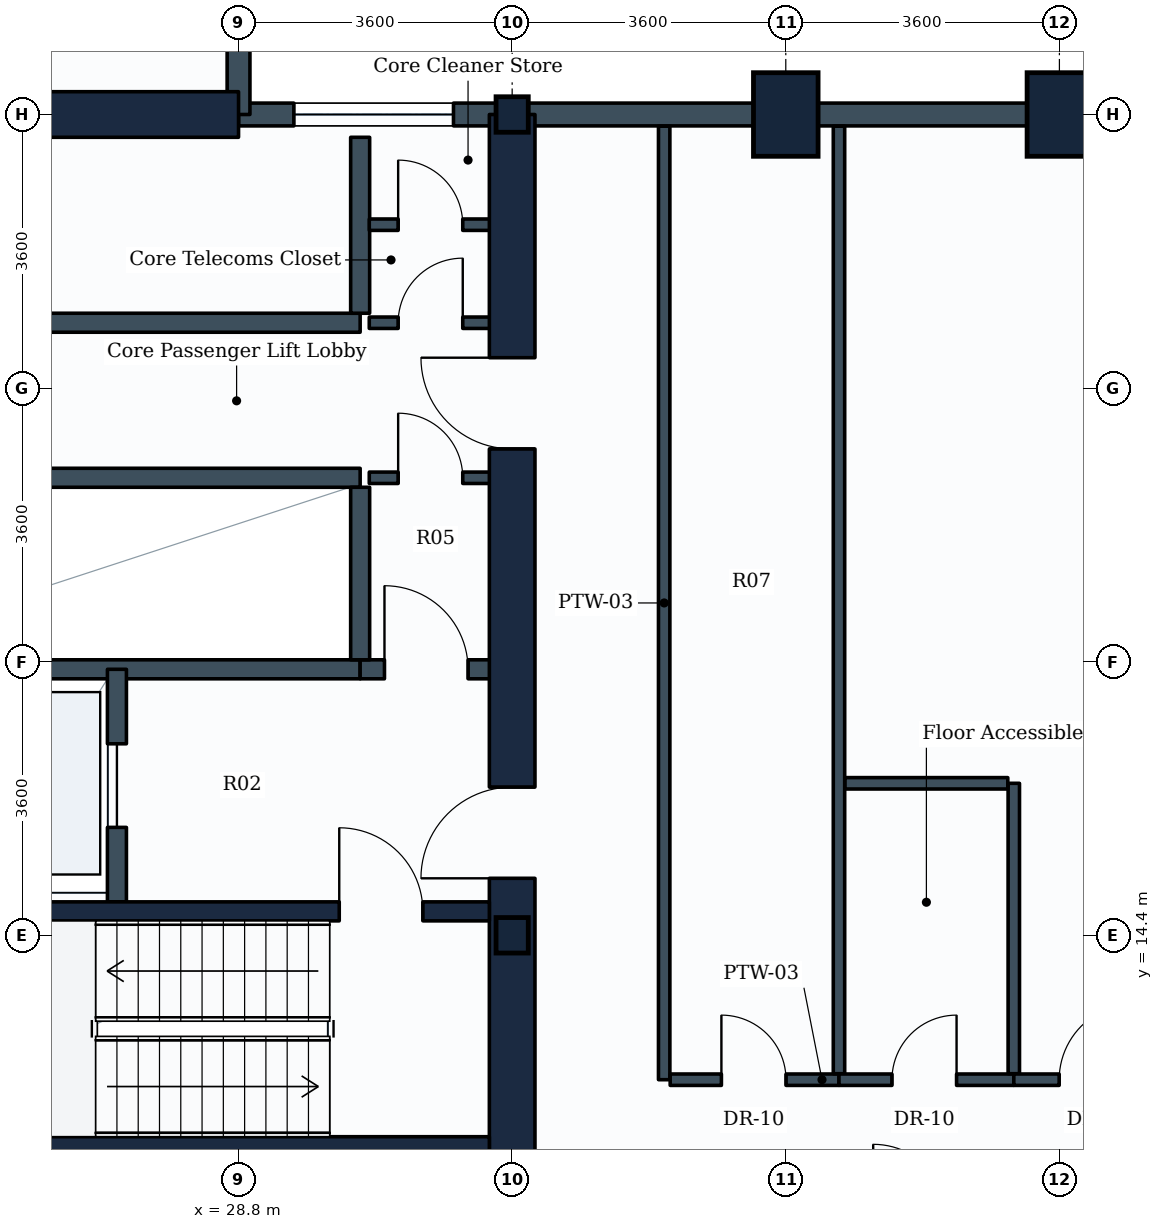
"""IFC4 building model, lengths in metres.
Left out: names, types, materials, properties, quantities, classifications, styles, units other than length and angle.
Written with IfcOpenShell. Run it as: python <this file> out.ifc"""

import sys

from ifc_helpers import new_model, si_unit, direction, frame, frame_2d, origin, origin_2d, place, context, subcontext, project, spatial, rectangle, i_section, extrude, element, fill, save


model = new_model("IFC4")
c1 = context("Model", 3, precision=1e-05, world=origin(), true_north=direction((0.0, 1.0)))
c2 = subcontext(c1, "Body", "Model", "MODEL_VIEW")
j1 = project(units=[si_unit("LENGTHUNIT", "METRE"), si_unit("PLANEANGLEUNIT", "RADIAN")], contexts=[c1])
p1 = place(None, origin())
s1 = spatial("IfcSite", under=j1, at=p1, CompositionType="ELEMENT")
p2 = place(p1, origin())
s2 = spatial("IfcBuilding", under=s1, at=p2, CompositionType="ELEMENT")
p3 = place(p2, frame((0.0, 0.0, 84.0)))
s3 = spatial("IfcBuildingStorey", under=s2, at=p3, CompositionType="ELEMENT", Elevation=84.0)
for number, where, z_axis, x_axis in (
    (1, (32.4, 14.4, 0.0), (0.0, 0.0, 1.0), (1.0, 0.0, 0.0)),
    (2, (32.4, 25.2, 0.0), (0.0, 0.0, 1.0), (1.0, 0.0, 0.0)),
):
    element("IfcColumn", number, at=place(p3, frame(where, z_axis=z_axis, x_axis=x_axis)), inside=s3, PredefinedType="COLUMN", context=c2, shape_type="SweptSolid", body=[
        extrude(i_section(OverallWidth=0.424, OverallDepth=0.467, WebThickness=0.033, FlangeThickness=0.053, FilletRadius=0.015, at=origin_2d()), origin(), (0.0, 0.0, 1.0), 3.9),
    ])
for number, where, z_axis, x_axis in (
    (3, (36.0, 25.2, 0.0), (0.0, 0.0, 1.0), (1.0, 0.0, 0.0)),
    (4, (39.6, 25.2, 0.0), (0.0, 0.0, 1.0), (1.0, 0.0, 0.0)),
):
    element("IfcColumn", number, at=place(p3, frame(where, z_axis=z_axis, x_axis=x_axis)), inside=s3, PredefinedType="COLUMN", context=c2, shape_type="SweptSolid", body=[
        extrude(rectangle(XDim=0.85, YDim=1.1, at=origin_2d()), origin(), (0.0, 0.0, 1.0), 3.9),
    ])
p4 = place(p3, frame((39.6, 25.2, 0.0), z_axis=(0.0, 0.0, 1.0), x_axis=(1.0, 0.0, 0.0)))
e5 = element("IfcWall", 5, at=p4, inside=s3, PredefinedType="STANDARD", context=c2, shape_type="SweptSolid", body=[
    extrude(rectangle(XDim=3.6, YDim=0.3, at=frame_2d((1.8, 0.0))), origin(), (0.0, 0.0, 1.0), 2.93),
])
for number, where, z_axis, x_axis in (
    (6, (36.0, 25.2, 0.0), (0.0, 0.0, 1.0), (1.0, 0.0, 0.0)),
    (7, (32.4, 25.2, 0.0), (0.0, 0.0, 1.0), (1.0, 0.0, 0.0)),
):
    element("IfcWall", number, at=place(p3, frame(where, z_axis=z_axis, x_axis=x_axis)), inside=s3, PredefinedType="STANDARD", context=c2, shape_type="SweptSolid", body=[
        extrude(rectangle(XDim=3.6, YDim=0.3, at=frame_2d((1.8, 0.0))), origin(), (0.0, 0.0, 1.0), 2.93),
    ])
p5 = place(p3, frame((28.8, 25.2, 0.0), z_axis=(0.0, 0.0, 1.0), x_axis=(1.0, 0.0, 0.0)))
e8 = element("IfcWall", 8, at=p5, inside=s3, PredefinedType="STANDARD", context=c2, shape_type="SweptSolid", body=[
    extrude(rectangle(XDim=3.6, YDim=0.3, at=frame_2d((1.8, 0.0))), origin(), (0.0, 0.0, 1.0), 3.635),
])
p6 = place(p5, frame((0.728, 0.0, 0.85)))
e9 = element("IfcOpeningElement", 9, at=p6, cuts=e8, PredefinedType="OPENING", context=c2, shape_type="SweptSolid", body=[
    extrude(rectangle(XDim=2.1, YDim=1.35, at=frame_2d((1.05, 0.675))), frame((0.0, 0.16, 0.0), z_axis=(0.0, -1.0, 0.0), x_axis=(1.0, 0.0, 0.0)), (0.0, 0.0, 1.0), 0.32),
])
p7 = place(p3, frame((28.8, 28.8, 0.0), z_axis=(0.0, 0.0, 1.0), x_axis=(0.0, -1.0, 0.0)))
e10 = element("IfcWall", 10, at=p7, inside=s3, PredefinedType="STANDARD", context=c2, shape_type="SweptSolid", body=[
    extrude(rectangle(XDim=3.6, YDim=0.3, at=frame_2d((1.8, 0.0))), origin(), (0.0, 0.0, 1.0), 3.19),
])
p8 = place(p3, frame((14.4, 25.2, 0.0), z_axis=(0.0, 0.0, 1.0), x_axis=(1.0, 0.0, 0.0)))
e11 = element("IfcWall", 11, at=p8, inside=s3, PredefinedType="SHEAR", context=c2, shape_type="SweptSolid", body=[
    extrude(rectangle(XDim=14.4, YDim=0.6, at=frame_2d((7.2, 0.0))), origin(), (0.0, 0.0, 1.0), 3.65),
])
p9 = place(p3, frame((32.4, 10.8, 0.0), z_axis=(0.0, 0.0, 1.0), x_axis=(0.0, 1.0, 0.0)))
e12 = element("IfcWall", 12, at=p9, inside=s3, PredefinedType="SHEAR", context=c2, shape_type="SweptSolid", body=[
    extrude(rectangle(XDim=14.4, YDim=0.6, at=frame_2d((7.2, 0.0))), origin(), (0.0, 0.0, 1.0), 3.65),
])
p10 = place(p9, frame((4.35, 0.0, 0.0)))
e13 = element("IfcOpeningElement", 13, at=p10, cuts=e12, PredefinedType="OPENING", context=c2, shape_type="SweptSolid", body=[
    extrude(rectangle(XDim=1.2, YDim=2.1, at=frame_2d((0.6, 1.05))), frame((0.0, 0.31, 0.0), z_axis=(0.0, -1.0, 0.0), x_axis=(1.0, 0.0, 0.0)), (0.0, 0.0, 1.0), 0.62),
])
p11 = place(p9, frame((10.0, 0.0, 0.0)))
e14 = element("IfcOpeningElement", 14, at=p11, cuts=e12, PredefinedType="OPENING", context=c2, shape_type="SweptSolid", body=[
    extrude(rectangle(XDim=1.2, YDim=2.1, at=frame_2d((0.6, 1.05))), frame((0.0, 0.31, 0.0), z_axis=(0.0, -1.0, 0.0), x_axis=(1.0, 0.0, 0.0)), (0.0, 0.0, 1.0), 0.62),
])
p12 = place(p3, frame((23.35, 11.625, 0.0), z_axis=(0.0, 0.0, 1.0), x_axis=(1.0, 0.0, 0.0)))
e15 = element("IfcWall", 15, at=p12, inside=s3, PredefinedType="SHEAR", context=c2, shape_type="SweptSolid", body=[
    extrude(rectangle(XDim=8.75, YDim=0.25, at=frame_2d((4.375, 0.0))), origin(), (0.0, 0.0, 1.0), 3.65),
])
p13 = place(p3, frame((23.35, 14.715, 0.0), z_axis=(0.0, 0.0, 1.0), x_axis=(1.0, 0.0, 0.0)))
e16 = element("IfcWall", 16, at=p13, inside=s3, PredefinedType="SHEAR", context=c2, shape_type="SweptSolid", body=[
    extrude(rectangle(XDim=8.75, YDim=0.25, at=frame_2d((4.375, 0.0))), origin(), (0.0, 0.0, 1.0), 3.65),
])
p14 = place(p13, frame((6.775, 0.0, 0.0)))
e17 = element("IfcOpeningElement", 17, at=p14, cuts=e16, PredefinedType="OPENING", context=c2, shape_type="SweptSolid", body=[
    extrude(rectangle(XDim=1.1, YDim=2.1, at=frame_2d((0.55, 1.05))), frame((0.0, 0.135, 0.0), z_axis=(0.0, -1.0, 0.0), x_axis=(1.0, 0.0, 0.0)), (0.0, 0.0, 1.0), 0.27),
])
p15 = place(p3, frame((21.88, 17.9, 0.0), z_axis=(0.0, 0.0, 1.0), x_axis=(1.0, 0.0, 0.0)))
e18 = element("IfcWall", 18, at=p15, inside=s3, PredefinedType="PARTITIONING", context=c2, shape_type="SweptSolid", body=[
    extrude(rectangle(XDim=8.52, YDim=0.25, at=frame_2d((4.26, 0.0))), origin(), (0.0, 0.0, 1.0), 3.635),
])
p16 = place(p3, frame((30.4, 17.9, 0.0), z_axis=(0.0, 0.0, 1.0), x_axis=(1.0, 0.0, 0.0)))
e19 = element("IfcWall", 19, at=p16, inside=s3, PredefinedType="PARTITIONING", context=c2, shape_type="SweptSolid", body=[
    extrude(rectangle(XDim=1.75, YDim=0.25, at=frame_2d((0.875, 0.0))), origin(), (0.0, 0.0, 1.0), 3.635),
])
p17 = place(p16, frame((0.32, 0.0, 0.0)))
e20 = element("IfcOpeningElement", 20, at=p17, cuts=e19, PredefinedType="OPENING", context=c2, shape_type="SweptSolid", body=[
    extrude(rectangle(XDim=1.1, YDim=2.1, at=frame_2d((0.55, 1.05))), frame((0.0, 0.135, 0.0), z_axis=(0.0, -1.0, 0.0), x_axis=(1.0, 0.0, 0.0)), (0.0, 0.0, 1.0), 0.27),
])
p18 = place(p3, frame((27.2, 14.84, 0.0), z_axis=(0.0, 0.0, 1.0), x_axis=(0.0, 1.0, 0.0)))
e21 = element("IfcWall", 21, at=p18, inside=s3, PredefinedType="PARTITIONING", context=c2, shape_type="SweptSolid", body=[
    extrude(rectangle(XDim=3.06, YDim=0.25, at=frame_2d((1.53, 0.0))), origin(), (0.0, 0.0, 1.0), 3.635),
])
p19 = place(p18, frame((0.98, 0.0, 0.0)))
e22 = element("IfcOpeningElement", 22, at=p19, cuts=e21, PredefinedType="OPENING", context=c2, shape_type="SweptSolid", body=[
    extrude(rectangle(XDim=1.1, YDim=2.1, at=frame_2d((0.55, 1.05))), frame((0.0, 0.135, 0.0), z_axis=(0.0, -1.0, 0.0), x_axis=(1.0, 0.0, 0.0)), (0.0, 0.0, 1.0), 0.27),
])
p20 = place(p3, frame((23.18, 20.42, 0.0), z_axis=(0.0, 0.0, 1.0), x_axis=(1.0, 0.0, 0.0)))
e23 = element("IfcWall", 23, at=p20, inside=s3, PredefinedType="PARTITIONING", context=c2, shape_type="SweptSolid", body=[
    extrude(rectangle(XDim=7.22, YDim=0.25, at=frame_2d((3.61, 0.0))), origin(), (0.0, 0.0, 1.0), 3.635),
])
p21 = place(p3, frame((30.4, 18.025, 0.0), z_axis=(0.0, 0.0, 1.0), x_axis=(0.0, 1.0, 0.0)))
e24 = element("IfcWall", 24, at=p21, inside=s3, PredefinedType="PARTITIONING", context=c2, shape_type="SweptSolid", body=[
    extrude(rectangle(XDim=2.27, YDim=0.25, at=frame_2d((1.135, 0.0))), origin(), (0.0, 0.0, 1.0), 3.635),
])
p22 = place(p3, frame((23.18, 22.46, 0.0), z_axis=(0.0, 0.0, 1.0), x_axis=(1.0, 0.0, 0.0)))
e25 = element("IfcWall", 25, at=p22, inside=s3, PredefinedType="PARTITIONING", context=c2, shape_type="SweptSolid", body=[
    extrude(rectangle(XDim=7.22, YDim=0.25, at=frame_2d((3.61, 0.0))), origin(), (0.0, 0.0, 1.0), 3.635),
])
p23 = place(p3, frame((30.4, 22.585, 0.0), z_axis=(0.0, 0.0, 1.0), x_axis=(0.0, 1.0, 0.0)))
e26 = element("IfcWall", 26, at=p23, inside=s3, PredefinedType="PARTITIONING", context=c2, shape_type="SweptSolid", body=[
    extrude(rectangle(XDim=2.315, YDim=0.25, at=frame_2d((1.157, 0.0))), origin(), (0.0, 0.0, 1.0), 3.635),
])
p24 = place(p3, frame((30.52, 22.46, 0.0), z_axis=(0.0, 0.0, 1.0), x_axis=(1.0, 0.0, 0.0)))
e27 = element("IfcWall", 27, at=p24, inside=s3, PredefinedType="PARTITIONING", context=c2, shape_type="SweptSolid", body=[
    extrude(rectangle(XDim=1.63, YDim=0.15, at=frame_2d((0.815, 0.0))), origin(), (0.0, 0.0, 1.0), 3.635),
])
p25 = place(p24, frame((0.38, 0.0, 0.0)))
e28 = element("IfcOpeningElement", 28, at=p25, cuts=e27, PredefinedType="OPENING", context=c2, shape_type="SweptSolid", body=[
    extrude(rectangle(XDim=0.85, YDim=2.1, at=frame_2d((0.425, 1.05))), frame((0.0, 0.085, 0.0), z_axis=(0.0, -1.0, 0.0), x_axis=(1.0, 0.0, 0.0)), (0.0, 0.0, 1.0), 0.17),
])
p26 = place(p3, frame((30.52, 23.75, 0.0), z_axis=(0.0, 0.0, 1.0), x_axis=(1.0, 0.0, 0.0)))
e29 = element("IfcWall", 29, at=p26, inside=s3, PredefinedType="PARTITIONING", context=c2, shape_type="SweptSolid", body=[
    extrude(rectangle(XDim=1.63, YDim=0.15, at=frame_2d((0.815, 0.0))), origin(), (0.0, 0.0, 1.0), 3.635),
])
p27 = place(p26, frame((0.38, 0.0, 0.0)))
e30 = element("IfcOpeningElement", 30, at=p27, cuts=e29, PredefinedType="OPENING", context=c2, shape_type="SweptSolid", body=[
    extrude(rectangle(XDim=0.85, YDim=2.1, at=frame_2d((0.425, 1.05))), frame((0.0, 0.085, 0.0), z_axis=(0.0, -1.0, 0.0), x_axis=(1.0, 0.0, 0.0)), (0.0, 0.0, 1.0), 0.17),
])
p28 = place(p3, frame((30.52, 20.42, 0.0), z_axis=(0.0, 0.0, 1.0), x_axis=(1.0, 0.0, 0.0)))
e31 = element("IfcWall", 31, at=p28, inside=s3, PredefinedType="PARTITIONING", context=c2, shape_type="SweptSolid", body=[
    extrude(rectangle(XDim=1.63, YDim=0.15, at=frame_2d((0.815, 0.0))), origin(), (0.0, 0.0, 1.0), 3.635),
])
p29 = place(p28, frame((0.38, 0.0, 0.0)))
e32 = element("IfcOpeningElement", 32, at=p29, cuts=e31, PredefinedType="OPENING", context=c2, shape_type="SweptSolid", body=[
    extrude(rectangle(XDim=0.85, YDim=2.1, at=frame_2d((0.425, 1.05))), frame((0.0, 0.085, 0.0), z_axis=(0.0, -1.0, 0.0), x_axis=(1.0, 0.0, 0.0)), (0.0, 0.0, 1.0), 0.17),
])
p30 = place(p3, frame((34.4, 12.5, 0.0), z_axis=(0.0, 0.0, 1.0), x_axis=(0.0, 1.0, 0.0)))
e33 = element("IfcWall", 33, at=p30, inside=s3, PredefinedType="PARTITIONING", context=c2, shape_type="SweptSolid", body=[
    extrude(rectangle(XDim=12.546, YDim=0.15, at=frame_2d((6.273, 0.0))), origin(), (0.0, 0.0, 1.0), 2.93),
])
p31 = place(p3, frame((34.479, 12.5, 0.0), z_axis=(0.0, 0.0, 1.0), x_axis=(1.0, 0.0, 0.0)))
e34 = element("IfcWall", 34, at=p31, inside=s3, PredefinedType="PARTITIONING", context=c2, shape_type="SweptSolid", body=[
    extrude(rectangle(XDim=2.221, YDim=0.15, at=frame_2d((1.11, 0.0))), origin(), (0.0, 0.0, 1.0), 3.18),
])
p32 = place(p31, frame((0.674, 0.0, 0.0)))
e35 = element("IfcOpeningElement", 35, at=p32, cuts=e34, PredefinedType="OPENING", context=c2, shape_type="SweptSolid", body=[
    extrude(rectangle(XDim=0.85, YDim=2.1, at=frame_2d((0.425, 1.05))), frame((0.0, 0.085, 0.0), z_axis=(0.0, -1.0, 0.0), x_axis=(1.0, 0.0, 0.0)), (0.0, 0.0, 1.0), 0.17),
])
p33 = place(p3, frame((36.7, 12.579, 0.0), z_axis=(0.0, 0.0, 1.0), x_axis=(0.0, 1.0, 0.0)))
e36 = element("IfcWall", 36, at=p33, inside=s3, PredefinedType="PARTITIONING", context=c2, shape_type="SweptSolid", body=[
    extrude(rectangle(XDim=12.467, YDim=0.15, at=frame_2d((6.233, 0.0))), origin(), (0.0, 0.0, 1.0), 2.93),
])
p34 = place(p3, frame((36.7, 12.5, 0.0), z_axis=(0.0, 0.0, 1.0), x_axis=(1.0, 0.0, 0.0)))
e37 = element("IfcWall", 37, at=p34, inside=s3, PredefinedType="PARTITIONING", context=c2, shape_type="SweptSolid", body=[
    extrude(rectangle(XDim=2.3, YDim=0.15, at=frame_2d((1.15, 0.0))), origin(), (0.0, 0.0, 1.0), 3.635),
])
p35 = place(p34, frame((0.697, 0.0, 0.0)))
e38 = element("IfcOpeningElement", 38, at=p35, cuts=e37, PredefinedType="OPENING", context=c2, shape_type="SweptSolid", body=[
    extrude(rectangle(XDim=0.85, YDim=2.1, at=frame_2d((0.425, 1.05))), frame((0.0, 0.085, 0.0), z_axis=(0.0, -1.0, 0.0), x_axis=(1.0, 0.0, 0.0)), (0.0, 0.0, 1.0), 0.17),
])
p36 = place(p3, frame((39.0, 12.579, 0.0), z_axis=(0.0, 0.0, 1.0), x_axis=(0.0, 1.0, 0.0)))
e39 = element("IfcWall", 39, at=p36, inside=s3, PredefinedType="PARTITIONING", context=c2, shape_type="SweptSolid", body=[
    extrude(rectangle(XDim=3.821, YDim=0.15, at=frame_2d((1.91, 0.0))), origin(), (0.0, 0.0, 1.0), 3.18),
])
p37 = place(p3, frame((36.779, 16.4, 0.0), z_axis=(0.0, 0.0, 1.0), x_axis=(1.0, 0.0, 0.0)))
e40 = element("IfcWall", 40, at=p37, inside=s3, PredefinedType="PARTITIONING", context=c2, shape_type="SweptSolid", body=[
    extrude(rectangle(XDim=2.142, YDim=0.15, at=frame_2d((1.071, 0.0))), origin(), (0.0, 0.0, 1.0), 3.635),
])
p38 = place(p3, frame((39.0, 12.5, 0.0), z_axis=(0.0, 0.0, 1.0), x_axis=(1.0, 0.0, 0.0)))
e41 = element("IfcWall", 41, at=p38, inside=s3, PredefinedType="PARTITIONING", context=c2, shape_type="SweptSolid", body=[
    extrude(rectangle(XDim=8.291, YDim=0.15, at=frame_2d((4.146, 0.0))), origin(), (0.0, 0.0, 1.0), 3.19),
])
p39 = place(p38, frame((0.597, 0.0, 0.0)))
e42 = element("IfcOpeningElement", 42, at=p39, cuts=e41, PredefinedType="OPENING", context=c2, shape_type="SweptSolid", body=[
    extrude(rectangle(XDim=1.0, YDim=2.1, at=frame_2d((0.5, 1.05))), frame((0.0, 0.085, 0.0), z_axis=(0.0, -1.0, 0.0), x_axis=(1.0, 0.0, 0.0)), (0.0, 0.0, 1.0), 0.17),
])
p40 = place(p6, origin())
e43 = element("IfcWindow", 43, at=p40, inside=s3, PartitioningType="SINGLE_PANEL", PredefinedType="WINDOW", context=c2, shape_type="SweptSolid", body=[
    extrude(rectangle(XDim=2.1, YDim=1.35, at=frame_2d((1.05, 0.675))), frame((0.0, 0.03, 0.0), z_axis=(0.0, -1.0, 0.0), x_axis=(1.0, 0.0, 0.0)), (0.0, 0.0, 1.0), 0.06),
])
fill(e9, e43)
p41 = place(p14, origin())
e44 = element("IfcDoor", 44, at=p41, inside=s3, OperationType="SINGLE_SWING_LEFT", PredefinedType="DOOR", context=c2, shape_type="SweptSolid", body=[
    extrude(rectangle(XDim=1.1, YDim=2.1, at=frame_2d((0.55, 1.05))), frame((0.0, 0.025, 0.0), z_axis=(0.0, -1.0, 0.0), x_axis=(1.0, 0.0, 0.0)), (0.0, 0.0, 1.0), 0.05),
])
fill(e17, e44)
p42 = place(p19, origin())
e45 = element("IfcDoor", 45, at=p42, inside=s3, OperationType="SLIDING_TO_LEFT", PredefinedType="DOOR", context=c2, shape_type="SweptSolid", body=[
    extrude(rectangle(XDim=1.1, YDim=2.1, at=frame_2d((0.55, 1.05))), frame((0.0, 0.025, 0.0), z_axis=(0.0, -1.0, 0.0), x_axis=(1.0, 0.0, 0.0)), (0.0, 0.0, 1.0), 0.05),
])
fill(e22, e45)
p43 = place(p10, origin())
e46 = element("IfcDoor", 46, at=p43, inside=s3, OperationType="SINGLE_SWING_LEFT", PredefinedType="DOOR", context=c2, shape_type="SweptSolid", body=[
    extrude(rectangle(XDim=1.2, YDim=2.1, at=frame_2d((0.6, 1.05))), frame((0.0, 0.025, 0.0), z_axis=(0.0, -1.0, 0.0), x_axis=(1.0, 0.0, 0.0)), (0.0, 0.0, 1.0), 0.05),
])
fill(e13, e46)
p44 = place(p17, origin())
e47 = element("IfcDoor", 47, at=p44, inside=s3, OperationType="SINGLE_SWING_LEFT", PredefinedType="DOOR", context=c2, shape_type="SweptSolid", body=[
    extrude(rectangle(XDim=1.1, YDim=2.1, at=frame_2d((0.55, 1.05))), frame((0.0, 0.025, 0.0), z_axis=(0.0, -1.0, 0.0), x_axis=(1.0, 0.0, 0.0)), (0.0, 0.0, 1.0), 0.05),
])
fill(e20, e47)
p45 = place(p11, origin())
e48 = element("IfcDoor", 48, at=p45, inside=s3, OperationType="SINGLE_SWING_RIGHT", PredefinedType="DOOR", context=c2, shape_type="SweptSolid", body=[
    extrude(rectangle(XDim=1.2, YDim=2.1, at=frame_2d((0.6, 1.05))), frame((0.0, 0.025, 0.0), z_axis=(0.0, -1.0, 0.0), x_axis=(1.0, 0.0, 0.0)), (0.0, 0.0, 1.0), 0.05),
])
fill(e14, e48)
p46 = place(p25, origin())
e49 = element("IfcDoor", 49, at=p46, inside=s3, OperationType="SINGLE_SWING_RIGHT", PredefinedType="DOOR", context=c2, shape_type="SweptSolid", body=[
    extrude(rectangle(XDim=0.85, YDim=2.1, at=frame_2d((0.425, 1.05))), frame((0.0, 0.025, 0.0), z_axis=(0.0, -1.0, 0.0), x_axis=(1.0, 0.0, 0.0)), (0.0, 0.0, 1.0), 0.05),
])
fill(e28, e49)
p47 = place(p27, origin())
e50 = element("IfcDoor", 50, at=p47, inside=s3, OperationType="SINGLE_SWING_LEFT", PredefinedType="DOOR", context=c2, shape_type="SweptSolid", body=[
    extrude(rectangle(XDim=0.85, YDim=2.1, at=frame_2d((0.425, 1.05))), frame((0.0, 0.025, 0.0), z_axis=(0.0, -1.0, 0.0), x_axis=(1.0, 0.0, 0.0)), (0.0, 0.0, 1.0), 0.05),
])
fill(e30, e50)
p48 = place(p29, origin())
e51 = element("IfcDoor", 51, at=p48, inside=s3, OperationType="SINGLE_SWING_LEFT", PredefinedType="DOOR", context=c2, shape_type="SweptSolid", body=[
    extrude(rectangle(XDim=0.85, YDim=2.1, at=frame_2d((0.425, 1.05))), frame((0.0, 0.025, 0.0), z_axis=(0.0, -1.0, 0.0), x_axis=(1.0, 0.0, 0.0)), (0.0, 0.0, 1.0), 0.05),
])
fill(e32, e51)
p49 = place(p32, origin())
e52 = element("IfcDoor", 52, at=p49, inside=s3, OperationType="SINGLE_SWING_LEFT", PredefinedType="DOOR", context=c2, shape_type="SweptSolid", body=[
    extrude(rectangle(XDim=0.85, YDim=2.1, at=frame_2d((0.425, 1.05))), frame((0.0, 0.025, 0.0), z_axis=(0.0, -1.0, 0.0), x_axis=(1.0, 0.0, 0.0)), (0.0, 0.0, 1.0), 0.05),
])
fill(e35, e52)
p50 = place(p35, origin())
e53 = element("IfcDoor", 53, at=p50, inside=s3, OperationType="SINGLE_SWING_RIGHT", PredefinedType="DOOR", context=c2, shape_type="SweptSolid", body=[
    extrude(rectangle(XDim=0.85, YDim=2.1, at=frame_2d((0.425, 1.05))), frame((0.0, 0.025, 0.0), z_axis=(0.0, -1.0, 0.0), x_axis=(1.0, 0.0, 0.0)), (0.0, 0.0, 1.0), 0.05),
])
fill(e38, e53)
p51 = place(p39, origin())
e54 = element("IfcDoor", 54, at=p51, inside=s3, OperationType="SINGLE_SWING_RIGHT", PredefinedType="DOOR", context=c2, shape_type="SweptSolid", body=[
    extrude(rectangle(XDim=1.0, YDim=2.1, at=frame_2d((0.5, 1.05))), frame((0.0, 0.025, 0.0), z_axis=(0.0, -1.0, 0.0), x_axis=(1.0, 0.0, 0.0)), (0.0, 0.0, 1.0), 0.05),
])
fill(e42, e54)
save(model, sys.argv[1])
